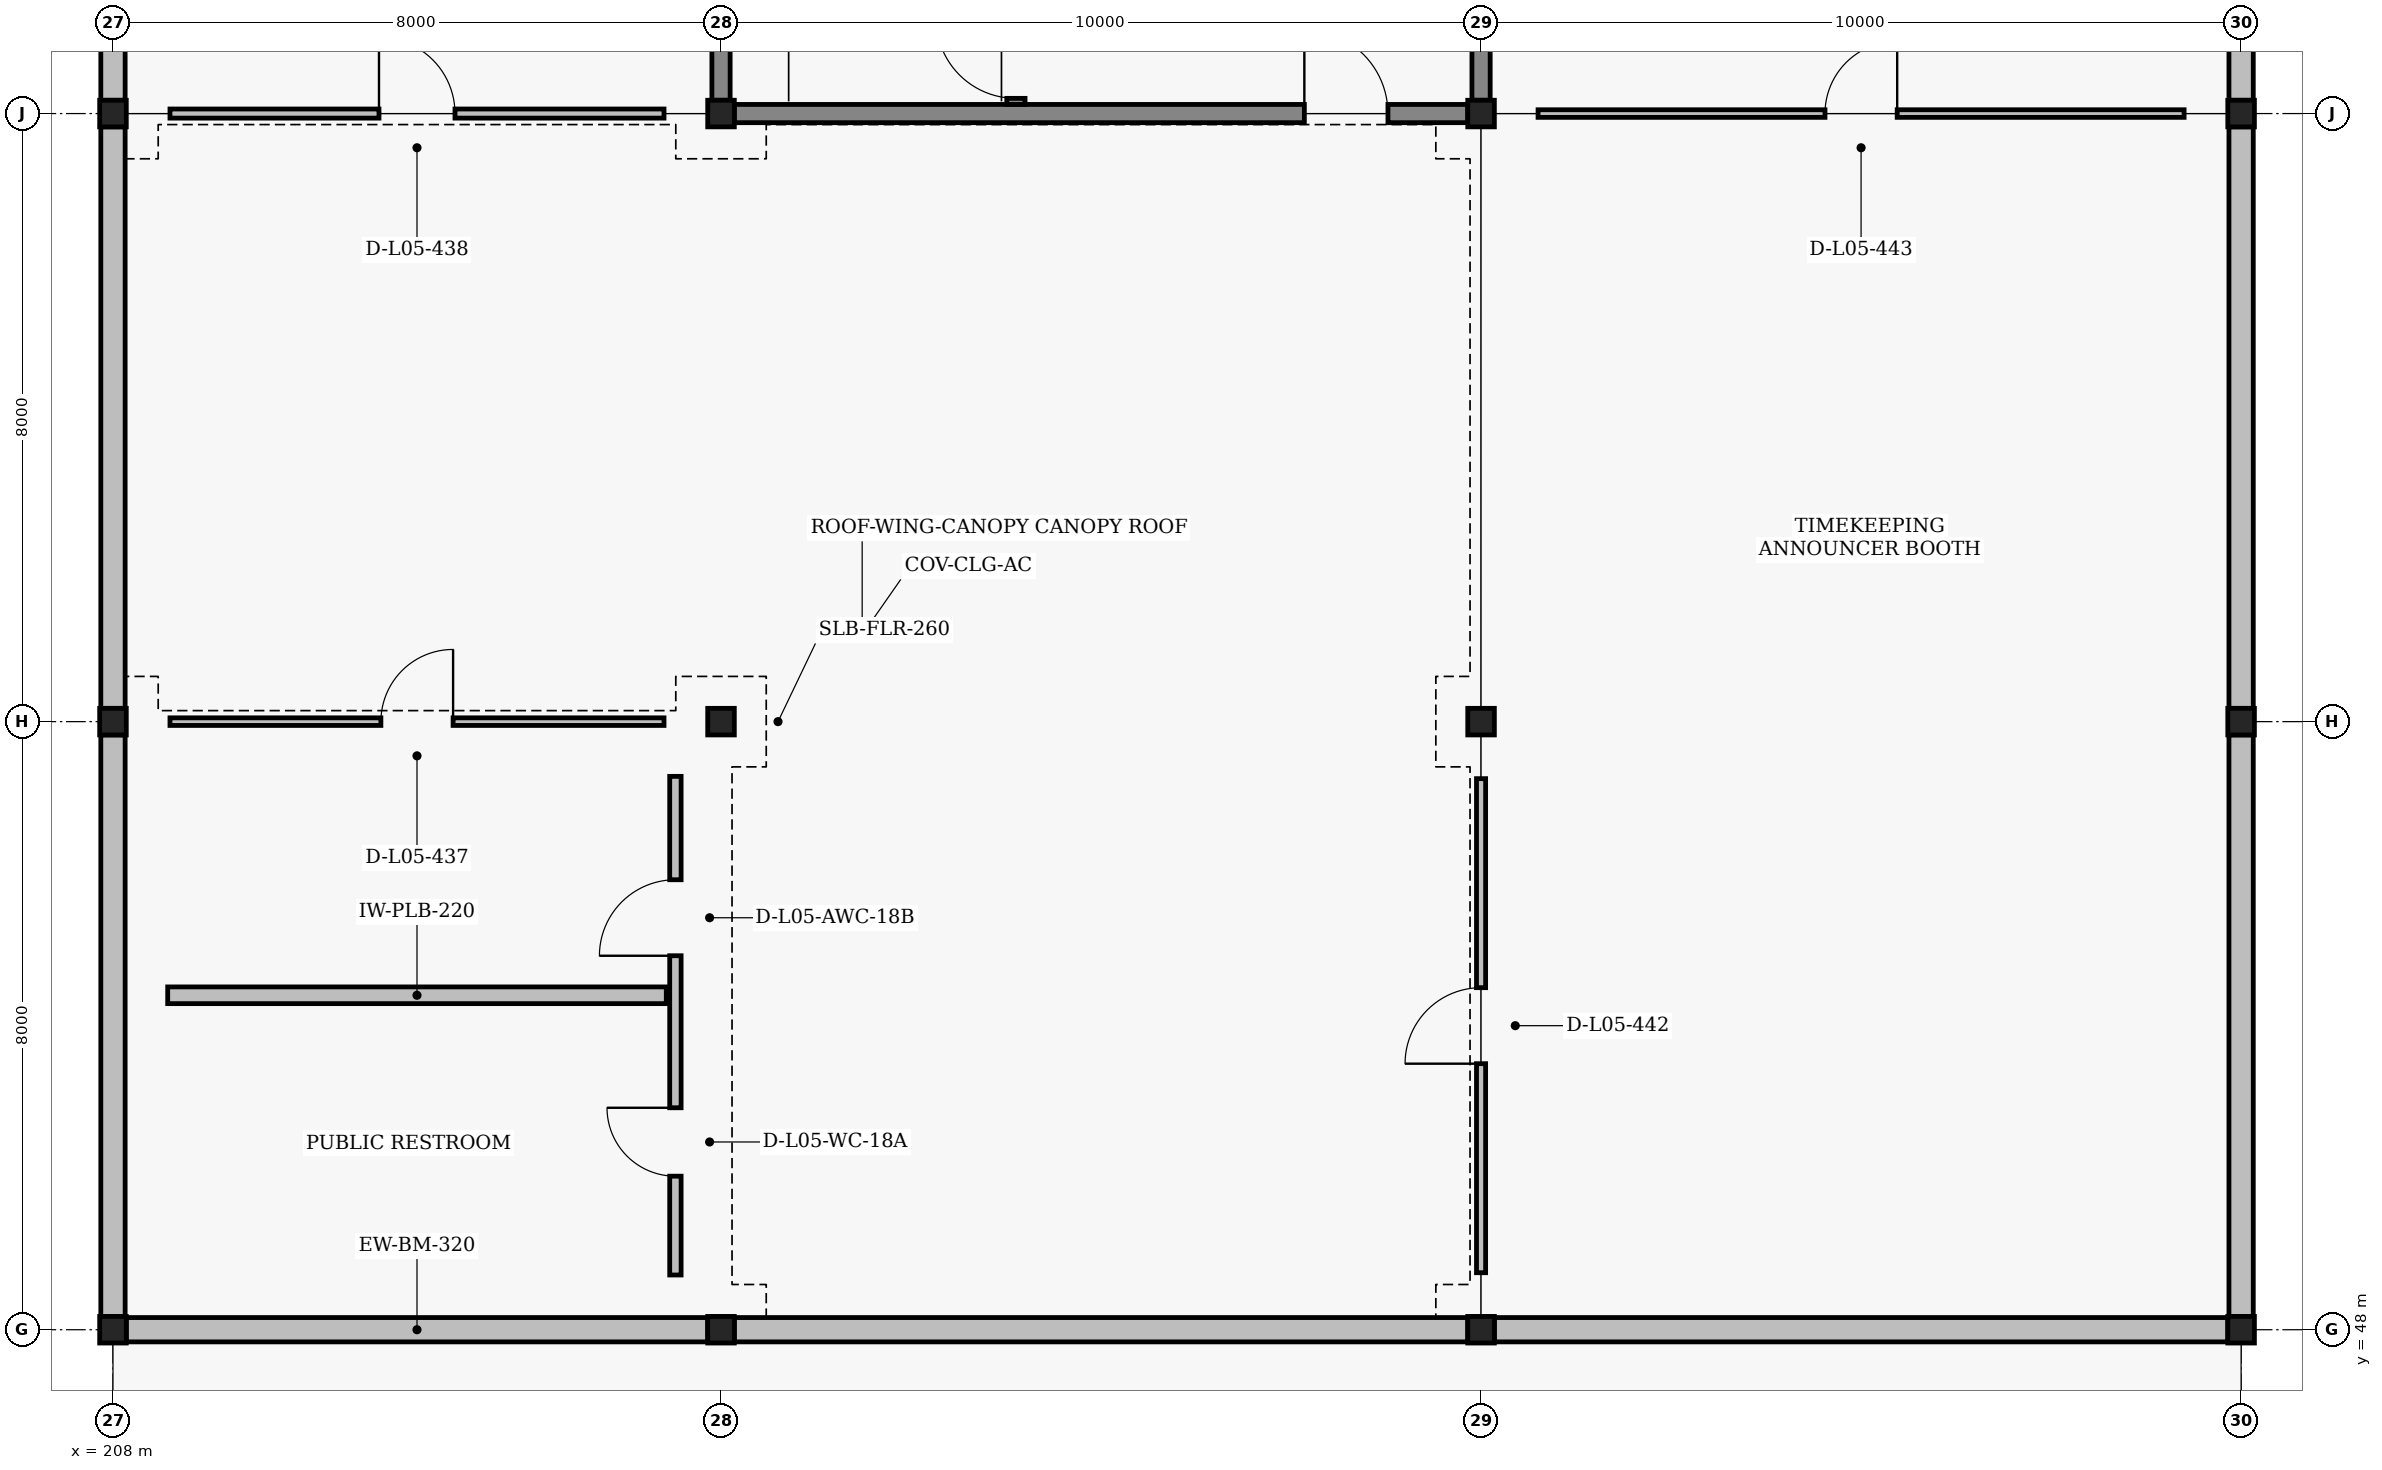
"""IFC4 building model, lengths in metres.
Left out: names, types, materials, properties, quantities, classifications, styles, units other than length and angle.
Written with IfcOpenShell. Run it as: python <this file> out.ifc"""

import sys

from ifc_helpers import new_model, si_unit, direction, frame, frame_2d, origin, origin_2d, place, context, subcontext, project, spatial, rectangle, hollow_rectangle, extrude, element, fill, save


model = new_model("IFC4")
c1 = context("Model", 3, precision=1e-05, world=origin(), true_north=direction((0.0, 1.0)))
c2 = subcontext(c1, "Body", "Model", "MODEL_VIEW")
j1 = project(units=[si_unit("LENGTHUNIT", "METRE"), si_unit("PLANEANGLEUNIT", "RADIAN")], contexts=[c1])
p1 = place(None, origin())
s1 = spatial("IfcSite", under=j1, at=p1, CompositionType="ELEMENT")
p2 = place(p1, origin())
s2 = spatial("IfcBuilding", under=s1, at=p2, CompositionType="ELEMENT")
p3 = place(p2, frame((0.0, 0.0, 18.6)))
s3 = spatial("IfcBuildingStorey", under=s2, at=p3, CompositionType="ELEMENT", Elevation=18.6)
for number, where, z_axis, x_axis in (
    (1, (208.0, 48.0, 0.0), (0.0, 0.0, 1.0), (1.0, 0.0, 0.0)),
    (2, (208.0, 56.0, 0.0), (0.0, 0.0, 1.0), (1.0, 0.0, 0.0)),
    (3, (208.0, 64.0, 0.0), (0.0, 0.0, 1.0), (1.0, 0.0, 0.0)),
    (4, (216.0, 48.0, 0.0), (0.0, 0.0, 1.0), (1.0, 0.0, 0.0)),
    (5, (216.0, 56.0, 0.0), (0.0, 0.0, 1.0), (1.0, 0.0, 0.0)),
    (6, (216.0, 64.0, 0.0), (0.0, 0.0, 1.0), (1.0, 0.0, 0.0)),
    (7, (226.0, 48.0, 0.0), (0.0, 0.0, 1.0), (1.0, 0.0, 0.0)),
    (8, (226.0, 56.0, 0.0), (0.0, 0.0, 1.0), (1.0, 0.0, 0.0)),
    (9, (226.0, 64.0, 0.0), (0.0, 0.0, 1.0), (1.0, 0.0, 0.0)),
    (10, (236.0, 48.0, 0.0), (0.0, 0.0, 1.0), (1.0, 0.0, 0.0)),
    (11, (236.0, 56.0, 0.0), (0.0, 0.0, 1.0), (1.0, 0.0, 0.0)),
    (12, (236.0, 64.0, 0.0), (0.0, 0.0, 1.0), (1.0, 0.0, 0.0)),
):
    element("IfcColumn", number, at=place(p3, frame(where, z_axis=z_axis, x_axis=x_axis)), inside=s3, PredefinedType="COLUMN", context=c2, shape_type="SweptSolid", body=[
        extrude(hollow_rectangle(XDim=0.35, YDim=0.35, WallThickness=0.016, at=origin_2d()), origin(), (0.0, 0.0, 1.0), 4.2),
    ])
for number, where, z_axis, x_axis in (
    (13, (208.175, 48.0, 0.0), (0.0, 0.0, 1.0), (1.0, 0.0, 0.0)),
    (14, (208.0, 48.175, 0.0), (0.0, 0.0, 1.0), (0.0, 1.0, 0.0)),
    (15, (208.0, 56.175, 0.0), (0.0, 0.0, 1.0), (0.0, 1.0, 0.0)),
    (16, (208.0, 64.175, 0.0), (0.0, 0.0, 1.0), (0.0, 1.0, 0.0)),
):
    element("IfcWall", number, at=place(p3, frame(where, z_axis=z_axis, x_axis=x_axis)), inside=s3, PredefinedType="SOLIDWALL", context=c2, shape_type="SweptSolid", body=[
        extrude(rectangle(XDim=7.65, YDim=0.32, at=frame_2d((3.825, 0.0))), origin(), (0.0, 0.0, 1.0), 3.35),
    ])
for number, where, z_axis, x_axis in (
    (17, (216.175, 48.0, 0.0), (0.0, 0.0, 1.0), (1.0, 0.0, 0.0)),
    (18, (226.175, 48.0, 0.0), (0.0, 0.0, 1.0), (1.0, 0.0, 0.0)),
):
    element("IfcWall", number, at=place(p3, frame(where, z_axis=z_axis, x_axis=x_axis)), inside=s3, PredefinedType="SOLIDWALL", context=c2, shape_type="SweptSolid", body=[
        extrude(rectangle(XDim=9.65, YDim=0.32, at=frame_2d((4.825, 0.0))), origin(), (0.0, 0.0, 1.0), 3.35),
    ])
for number, where, z_axis, x_axis in (
    (19, (236.0, 48.175, 0.0), (0.0, 0.0, 1.0), (0.0, 1.0, 0.0)),
    (20, (236.0, 56.175, 0.0), (0.0, 0.0, 1.0), (0.0, 1.0, 0.0)),
    (21, (236.0, 64.175, 0.0), (0.0, 0.0, 1.0), (0.0, 1.0, 0.0)),
):
    element("IfcWall", number, at=place(p3, frame(where, z_axis=z_axis, x_axis=x_axis)), inside=s3, PredefinedType="SOLIDWALL", context=c2, shape_type="SweptSolid", body=[
        extrude(rectangle(XDim=7.65, YDim=0.32, at=frame_2d((3.825, 0.0))), origin(), (0.0, 0.0, 1.0), 3.27),
    ])
p4 = place(p3, frame((216.175, 64.0, 0.0), z_axis=(0.0, 0.0, 1.0), x_axis=(1.0, 0.0, 0.0)))
e22 = element("IfcWall", 22, at=p4, inside=s3, PredefinedType="SHEAR", context=c2, shape_type="SweptSolid", body=[
    extrude(rectangle(XDim=9.65, YDim=0.24, at=frame_2d((4.825, 0.0))), origin(), (0.0, 0.0, 1.0), 3.27),
])
p5 = place(p4, frame((7.5, 0.0, 0.0)))
e23 = element("IfcOpeningElement", 23, at=p5, cuts=e22, PredefinedType="OPENING", context=c2, shape_type="SweptSolid", body=[
    extrude(rectangle(XDim=1.1, YDim=2.2, at=frame_2d((0.55, 1.1))), frame((0.0, 0.13, 0.0), z_axis=(0.0, -1.0, 0.0), x_axis=(1.0, 0.0, 0.0)), (0.0, 0.0, 1.0), 0.26),
])
p6 = place(p3, frame((216.0, 64.175, 0.0), z_axis=(0.0, 0.0, 1.0), x_axis=(0.0, 1.0, 0.0)))
e24 = element("IfcWall", 24, at=p6, inside=s3, PredefinedType="SHEAR", context=c2, shape_type="SweptSolid", body=[
    extrude(rectangle(XDim=7.65, YDim=0.24, at=frame_2d((3.825, 0.0))), origin(), (0.0, 0.0, 1.0), 3.37),
])
p7 = place(p3, frame((226.0, 64.175, 0.0), z_axis=(0.0, 0.0, 1.0), x_axis=(0.0, 1.0, 0.0)))
e25 = element("IfcWall", 25, at=p7, inside=s3, PredefinedType="SHEAR", context=c2, shape_type="SweptSolid", body=[
    extrude(rectangle(XDim=7.65, YDim=0.24, at=frame_2d((3.825, 0.0))), origin(), (0.0, 0.0, 1.0), 3.27),
])
p8 = place(p3, frame((219.88, 64.12, 0.0), z_axis=(0.0, 0.0, 1.0), x_axis=(0.0, 1.0, 0.0)))
e26 = element("IfcWall", 26, at=p8, inside=s3, PredefinedType="SHEAR", context=c2, shape_type="SweptSolid", body=[
    extrude(rectangle(XDim=7.76, YDim=0.24, at=frame_2d((3.88, 0.0))), origin(), (0.0, 0.0, 1.0), 3.47),
])
p9 = place(p8, frame((0.08, 0.0, 0.0)))
e27 = element("IfcOpeningElement", 27, at=p9, cuts=e26, PredefinedType="OPENING", context=c2, shape_type="SweptSolid", body=[
    extrude(rectangle(XDim=1.05, YDim=2.15, at=frame_2d((0.525, 1.075))), frame((0.0, 0.13, 0.0), z_axis=(0.0, -1.0, 0.0), x_axis=(1.0, 0.0, 0.0)), (0.0, 0.0, 1.0), 0.26),
])
p10 = place(p3, frame((208.72, 52.4, 0.0), z_axis=(0.0, 0.0, 1.0), x_axis=(1.0, 0.0, 0.0)))
e28 = element("IfcWall", 28, at=p10, inside=s3, PredefinedType="PLUMBINGWALL", context=c2, shape_type="SweptSolid", body=[
    extrude(rectangle(XDim=6.56, YDim=0.22, at=frame_2d((3.28, 0.0))), origin(), (0.0, 0.0, 1.0), 3.67),
])
p11 = place(p3, frame((215.4, 48.72, 0.0), z_axis=(0.0, 0.0, 1.0), x_axis=(0.0, 1.0, 0.0)))
e29 = element("IfcWall", 29, at=p11, inside=s3, PredefinedType="PARTITIONING", context=c2, shape_type="SweptSolid", body=[
    extrude(rectangle(XDim=6.56, YDim=0.15, at=frame_2d((3.28, 0.0))), origin(), (0.0, 0.0, 1.0), 3.67),
])
p12 = place(p11, frame((1.3, 0.0, 0.0)))
e30 = element("IfcOpeningElement", 30, at=p12, cuts=e29, PredefinedType="OPENING", context=c2, shape_type="SweptSolid", body=[
    extrude(rectangle(XDim=0.9, YDim=2.1, at=frame_2d((0.45, 1.05))), frame((0.0, 0.085, 0.0), z_axis=(0.0, -1.0, 0.0), x_axis=(1.0, 0.0, 0.0)), (0.0, 0.0, 1.0), 0.17),
])
p13 = place(p11, frame((4.2, 0.0, 0.0)))
e31 = element("IfcOpeningElement", 31, at=p13, cuts=e29, PredefinedType="OPENING", context=c2, shape_type="SweptSolid", body=[
    extrude(rectangle(XDim=1.0, YDim=2.15, at=frame_2d((0.5, 1.075))), frame((0.0, 0.085, 0.0), z_axis=(0.0, -1.0, 0.0), x_axis=(1.0, 0.0, 0.0)), (0.0, 0.0, 1.0), 0.17),
])
p14 = place(p3, frame((208.75, 56.0, 0.0), z_axis=(0.0, 0.0, 1.0), x_axis=(1.0, 0.0, 0.0)))
e32 = element("IfcWall", 32, at=p14, inside=s3, PredefinedType="PARTITIONING", context=c2, shape_type="SweptSolid", body=[
    extrude(rectangle(XDim=6.5, YDim=0.1, at=frame_2d((3.25, 0.0))), origin(), (0.0, 0.0, 1.0), 3.47),
])
p15 = place(p14, frame((2.775, 0.0, 0.0)))
e33 = element("IfcOpeningElement", 33, at=p15, cuts=e32, PredefinedType="OPENING", context=c2, shape_type="SweptSolid", body=[
    extrude(rectangle(XDim=0.95, YDim=2.1, at=frame_2d((0.475, 1.05))), frame((0.0, 0.06, 0.0), z_axis=(0.0, -1.0, 0.0), x_axis=(1.0, 0.0, 0.0)), (0.0, 0.0, 1.0), 0.12),
])
p16 = place(p3, frame((208.75, 64.0, 0.0), z_axis=(0.0, 0.0, 1.0), x_axis=(1.0, 0.0, 0.0)))
e34 = element("IfcWall", 34, at=p16, inside=s3, PredefinedType="PARTITIONING", context=c2, shape_type="SweptSolid", body=[
    extrude(rectangle(XDim=6.5, YDim=0.12, at=frame_2d((3.25, 0.0))), origin(), (0.0, 0.0, 1.0), 3.47),
])
p17 = place(p16, frame((2.75, 0.0, 0.0)))
e35 = element("IfcOpeningElement", 35, at=p17, cuts=e34, PredefinedType="OPENING", context=c2, shape_type="SweptSolid", body=[
    extrude(rectangle(XDim=1.0, YDim=2.1, at=frame_2d((0.5, 1.05))), frame((0.0, 0.07, 0.0), z_axis=(0.0, -1.0, 0.0), x_axis=(1.0, 0.0, 0.0)), (0.0, 0.0, 1.0), 0.14),
])
p18 = place(p3, frame((226.0, 48.75, 0.0), z_axis=(0.0, 0.0, 1.0), x_axis=(0.0, 1.0, 0.0)))
e36 = element("IfcWall", 36, at=p18, inside=s3, PredefinedType="PARTITIONING", context=c2, shape_type="SweptSolid", body=[
    extrude(rectangle(XDim=6.5, YDim=0.12, at=frame_2d((3.25, 0.0))), origin(), (0.0, 0.0, 1.0), 3.37),
])
p19 = place(p18, frame((2.75, 0.0, 0.0)))
e37 = element("IfcOpeningElement", 37, at=p19, cuts=e36, PredefinedType="OPENING", context=c2, shape_type="SweptSolid", body=[
    extrude(rectangle(XDim=1.0, YDim=2.1, at=frame_2d((0.5, 1.05))), frame((0.0, 0.07, 0.0), z_axis=(0.0, -1.0, 0.0), x_axis=(1.0, 0.0, 0.0)), (0.0, 0.0, 1.0), 0.14),
])
p20 = place(p3, frame((226.75, 64.0, 0.0), z_axis=(0.0, 0.0, 1.0), x_axis=(1.0, 0.0, 0.0)))
e38 = element("IfcWall", 38, at=p20, inside=s3, PredefinedType="PARTITIONING", context=c2, shape_type="SweptSolid", body=[
    extrude(rectangle(XDim=8.5, YDim=0.1, at=frame_2d((4.25, 0.0))), origin(), (0.0, 0.0, 1.0), 3.27),
])
p21 = place(p20, frame((3.775, 0.0, 0.0)))
e39 = element("IfcOpeningElement", 39, at=p21, cuts=e38, PredefinedType="OPENING", context=c2, shape_type="SweptSolid", body=[
    extrude(rectangle(XDim=0.95, YDim=2.1, at=frame_2d((0.475, 1.05))), frame((0.0, 0.06, 0.0), z_axis=(0.0, -1.0, 0.0), x_axis=(1.0, 0.0, 0.0)), (0.0, 0.0, 1.0), 0.12),
])
p22 = place(p5, origin())
e40 = element("IfcDoor", 40, at=p22, inside=s3, OperationType="SINGLE_SWING_LEFT", PredefinedType="DOOR", context=c2, shape_type="SweptSolid", body=[
    extrude(rectangle(XDim=1.1, YDim=2.2, at=frame_2d((0.55, 1.1))), frame((0.0, 0.025, 0.0), z_axis=(0.0, -1.0, 0.0), x_axis=(1.0, 0.0, 0.0)), (0.0, 0.0, 1.0), 0.05),
])
fill(e23, e40)
p23 = place(p9, origin())
e41 = element("IfcDoor", 41, at=p23, inside=s3, OperationType="SINGLE_SWING_RIGHT", PredefinedType="DOOR", context=c2, shape_type="SweptSolid", body=[
    extrude(rectangle(XDim=1.05, YDim=2.15, at=frame_2d((0.525, 1.075))), frame((0.0, 0.025, 0.0), z_axis=(0.0, -1.0, 0.0), x_axis=(1.0, 0.0, 0.0)), (0.0, 0.0, 1.0), 0.05),
])
fill(e27, e41)
p24 = place(p12, origin())
e42 = element("IfcDoor", 42, at=p24, inside=s3, OperationType="SINGLE_SWING_RIGHT", PredefinedType="DOOR", context=c2, shape_type="SweptSolid", body=[
    extrude(rectangle(XDim=0.9, YDim=2.1, at=frame_2d((0.45, 1.05))), frame((0.0, 0.025, 0.0), z_axis=(0.0, -1.0, 0.0), x_axis=(1.0, 0.0, 0.0)), (0.0, 0.0, 1.0), 0.05),
])
fill(e30, e42)
p25 = place(p13, origin())
e43 = element("IfcDoor", 43, at=p25, inside=s3, OperationType="SINGLE_SWING_LEFT", PredefinedType="DOOR", context=c2, shape_type="SweptSolid", body=[
    extrude(rectangle(XDim=1.0, YDim=2.15, at=frame_2d((0.5, 1.075))), frame((0.0, 0.025, 0.0), z_axis=(0.0, -1.0, 0.0), x_axis=(1.0, 0.0, 0.0)), (0.0, 0.0, 1.0), 0.05),
])
fill(e31, e43)
p26 = place(p15, origin())
e44 = element("IfcDoor", 44, at=p26, inside=s3, OperationType="SINGLE_SWING_RIGHT", PredefinedType="DOOR", context=c2, shape_type="SweptSolid", body=[
    extrude(rectangle(XDim=0.95, YDim=2.1, at=frame_2d((0.475, 1.05))), frame((0.0, 0.025, 0.0), z_axis=(0.0, -1.0, 0.0), x_axis=(1.0, 0.0, 0.0)), (0.0, 0.0, 1.0), 0.05),
])
fill(e33, e44)
p27 = place(p17, origin())
e45 = element("IfcDoor", 45, at=p27, inside=s3, OperationType="SINGLE_SWING_LEFT", PredefinedType="DOOR", context=c2, shape_type="SweptSolid", body=[
    extrude(rectangle(XDim=1.0, YDim=2.1, at=frame_2d((0.5, 1.05))), frame((0.0, 0.025, 0.0), z_axis=(0.0, -1.0, 0.0), x_axis=(1.0, 0.0, 0.0)), (0.0, 0.0, 1.0), 0.05),
])
fill(e35, e45)
p28 = place(p19, origin())
e46 = element("IfcDoor", 46, at=p28, inside=s3, OperationType="SINGLE_SWING_LEFT", PredefinedType="DOOR", context=c2, shape_type="SweptSolid", body=[
    extrude(rectangle(XDim=1.0, YDim=2.1, at=frame_2d((0.5, 1.05))), frame((0.0, 0.025, 0.0), z_axis=(0.0, -1.0, 0.0), x_axis=(1.0, 0.0, 0.0)), (0.0, 0.0, 1.0), 0.05),
])
fill(e37, e46)
p29 = place(p21, origin())
e47 = element("IfcDoor", 47, at=p29, inside=s3, OperationType="SINGLE_SWING_RIGHT", PredefinedType="DOOR", context=c2, shape_type="SweptSolid", body=[
    extrude(rectangle(XDim=0.95, YDim=2.1, at=frame_2d((0.475, 1.05))), frame((0.0, 0.025, 0.0), z_axis=(0.0, -1.0, 0.0), x_axis=(1.0, 0.0, 0.0)), (0.0, 0.0, 1.0), 0.05),
])
fill(e39, e47)
save(model, sys.argv[1])
